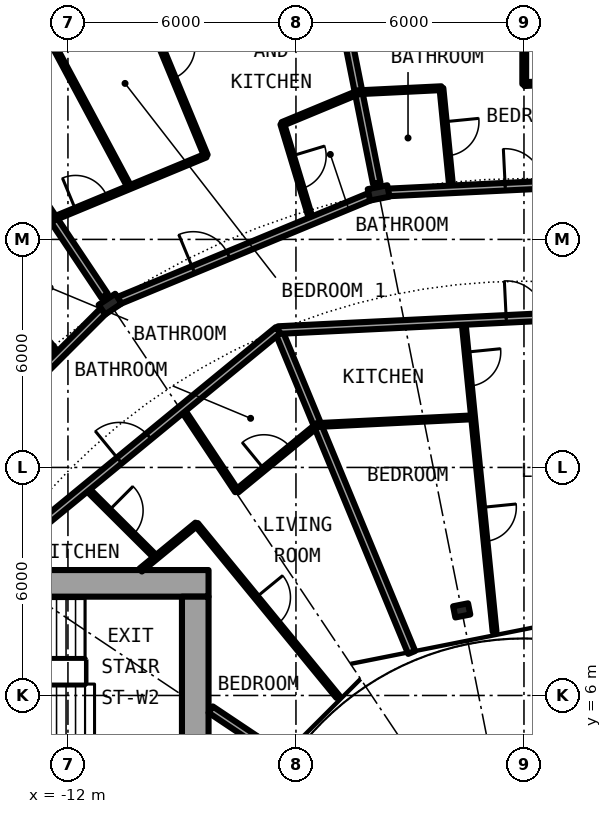
"""IFC4 building model, lengths in metres.
Left out: names, types, materials, properties, quantities, classifications, styles, units other than length and angle.
Written with IfcOpenShell. Run it as: python <this file> out.ifc"""

import sys

from ifc_helpers import new_model, si_unit, direction, frame, frame_2d, origin, origin_2d, place, context, subcontext, project, spatial, rectangle, i_section, extrude, element, fill, save


model = new_model("IFC4")
c1 = context("Model", 3, precision=1e-05, world=origin(), true_north=direction((0.0, 1.0)))
c2 = subcontext(c1, "Body", "Model", "MODEL_VIEW")
j1 = project(units=[si_unit("LENGTHUNIT", "METRE"), si_unit("PLANEANGLEUNIT", "RADIAN")], contexts=[c1])
p1 = place(None, origin())
s1 = spatial("IfcSite", under=j1, at=p1, CompositionType="ELEMENT")
p2 = place(p1, origin())
s2 = spatial("IfcBuilding", under=s1, at=p2, CompositionType="ELEMENT")
p3 = place(p2, frame((0.0, 0.0, 72.75)))
s3 = spatial("IfcBuildingStorey", under=s2, at=p3, CompositionType="ELEMENT", Elevation=72.75)
for number, where, z_axis, x_axis in (
    (1, (-3.824, 19.223, 0.0), (0.0, 0.0, 1.0), (-0.195, 0.981, 0.0)),
    (2, (-10.889, 16.297, 0.0), (0.0, 0.0, 1.0), (-0.556, 0.831, 0.0)),
):
    element("IfcColumn", number, at=place(p3, frame(where, z_axis=z_axis, x_axis=x_axis)), inside=s3, PredefinedType="COLUMN", context=c2, shape_type="SweptSolid", body=[
        extrude(i_section(OverallWidth=0.306, OverallDepth=0.524, WebThickness=0.021, FlangeThickness=0.04, FilletRadius=0.027, at=origin_2d()), origin(), (0.0, 0.0, 1.0), 3.05),
    ])
p4 = place(p3, frame((-1.639, 8.239, 0.0), z_axis=(0.0, 0.0, 1.0), x_axis=(-0.195090322016, 0.980785280403, 0.0)))
e3 = element("IfcColumn", 3, at=p4, inside=s3, PredefinedType="COLUMN", context=c2, shape_type="SweptSolid", body=[
    extrude(i_section(OverallWidth=0.3, OverallDepth=0.4, WebThickness=0.013, FlangeThickness=0.024, FilletRadius=0.027, at=origin_2d()), origin(), (0.0, 0.0, 1.0), 3.05),
])
p5 = place(p3, frame((-10.447, 25.222, 0.0), z_axis=(0.0, 0.0, 1.0), x_axis=(-0.881915646801, -0.471407246368, 0.0)))
e4 = element("IfcWall", 4, at=p5, inside=s3, PredefinedType="SOLIDWALL", context=c2, shape_type="SweptSolid", body=[
    extrude(rectangle(XDim=5.352, YDim=0.25, at=frame_2d((2.676, 0.0))), origin(), (0.0, 0.0, 1.0), 2.7),
])
p6 = place(p5, frame((0.441, 0.0, 0.3)))
e5 = element("IfcOpeningElement", 5, at=p6, cuts=e4, PredefinedType="OPENING", context=c2, shape_type="SweptSolid", body=[
    extrude(rectangle(XDim=1.8, YDim=2.1, at=frame_2d((0.9, 1.05))), frame((0.0, 0.135, 0.0), z_axis=(0.0, -1.0, 0.0), x_axis=(1.0, 0.0, 0.0)), (0.0, 0.0, 1.0), 0.27),
])
p7 = place(p5, frame((3.51, 0.0, 0.0)))
e6 = element("IfcOpeningElement", 6, at=p7, cuts=e4, PredefinedType="OPENING", context=c2, shape_type="SweptSolid", body=[
    extrude(rectangle(XDim=1.0, YDim=2.2, at=frame_2d((0.5, 1.1))), frame((0.0, 0.135, 0.0), z_axis=(0.0, -1.0, 0.0), x_axis=(1.0, 0.0, 0.0)), (0.0, 0.0, 1.0), 0.27),
])
p8 = place(p3, frame((-8.3, 8.95, 0.0), z_axis=(0.0, 0.0, 1.0), x_axis=(-1.0, 0.0, 0.0)))
e7 = element("IfcWall", 7, at=p8, inside=s3, PredefinedType="SHEAR", context=c2, shape_type="SweptSolid", body=[
    extrude(rectangle(XDim=14.0, YDim=0.7, at=frame_2d((7.0, 0.0))), origin(), (0.0, 0.0, 1.0), 3.05),
])
p9 = place(p8, frame((11.575, 0.0, 0.0)))
e8 = element("IfcOpeningElement", 8, at=p9, cuts=e7, PredefinedType="OPENING", context=c2, shape_type="SweptSolid", body=[
    extrude(rectangle(XDim=1.2, YDim=2.3, at=frame_2d((0.6, 1.15))), frame((0.0, 0.36, 0.0), z_axis=(0.0, -1.0, 0.0), x_axis=(1.0, 0.0, 0.0)), (0.0, 0.0, 1.0), 0.72),
])
p10 = place(p3, frame((-8.65, 8.6, 0.0), z_axis=(0.0, 0.0, 1.0), x_axis=(0.0, -1.0, 0.0)))
e9 = element("IfcWall", 9, at=p10, inside=s3, PredefinedType="SHEAR", context=c2, shape_type="SweptSolid", body=[
    extrude(rectangle(XDim=17.2, YDim=0.7, at=frame_2d((8.6, 0.0))), origin(), (0.0, 0.0, 1.0), 3.05),
])
p11 = place(p10, frame((7.4, 0.0, 0.1)))
e10 = element("IfcOpeningElement", 10, at=p11, cuts=e9, PredefinedType="OPENING", context=c2, shape_type="SweptSolid", body=[
    extrude(rectangle(XDim=2.4, YDim=2.2, at=frame_2d((1.2, 1.1))), frame((0.0, 0.36, 0.0), z_axis=(0.0, -1.0, 0.0), x_axis=(1.0, 0.0, 0.0)), (0.0, 0.0, 1.0), 0.72),
])
p12 = place(p3, frame((-15.097, 22.595, 0.0), z_axis=(0.0, 0.0, 1.0), x_axis=(0.555516661303, -0.831505405283, 0.0)))
e11 = element("IfcWall", 11, at=p12, inside=s3, PredefinedType="PARTITIONING", context=c2, shape_type="SweptSolid", body=[
    extrude(rectangle(XDim=7.312, YDim=0.2, at=frame_2d((3.656, 0.0))), origin(), (0.0, 0.0, 1.0), 2.7),
])
p13 = place(p3, frame((-13.927, 17.004, 0.0), z_axis=(0.0, 0.0, 1.0), x_axis=(0.633582447834, -0.77367517848, 0.0)))
e12 = element("IfcWall", 12, at=p13, inside=s3, PredefinedType="PARTITIONING", context=c2, shape_type="SweptSolid", body=[
    extrude(rectangle(XDim=2.661, YDim=0.1, at=frame_2d((1.331, 0.0))), origin(), (0.0, 0.0, 1.0), 2.7),
])
p14 = place(p13, frame((0.881, 0.0, 0.0)))
e13 = element("IfcOpeningElement", 13, at=p14, cuts=e12, PredefinedType="OPENING", context=c2, shape_type="SweptSolid", body=[
    extrude(rectangle(XDim=0.9, YDim=2.3, at=frame_2d((0.45, 1.15))), frame((0.0, 0.06, 0.0), z_axis=(0.0, -1.0, 0.0), x_axis=(1.0, 0.0, 0.0)), (0.0, 0.0, 1.0), 0.12),
])
p15 = place(p3, frame((-12.833, 23.954, 0.0), z_axis=(0.0, 0.0, 1.0), x_axis=(0.472148388886, -0.881519085938, 0.0)))
e14 = element("IfcWall", 14, at=p15, inside=s3, PredefinedType="PARTITIONING", context=c2, shape_type="SweptSolid", body=[
    extrude(rectangle(XDim=5.196, YDim=0.1, at=frame_2d((2.598, 0.0))), origin(), (0.0, 0.0, 1.0), 2.7),
])
p16 = place(p3, frame((-11.524, 11.464, 0.0), z_axis=(0.0, 0.0, 1.0), x_axis=(0.708796844581, -0.705412668665, 0.0)))
e15 = element("IfcWall", 15, at=p16, inside=s3, PredefinedType="PARTITIONING", context=c2, shape_type="SweptSolid", body=[
    extrude(rectangle(XDim=2.597, YDim=0.1, at=frame_2d((1.299, 0.0))), origin(), (0.0, 0.0, 1.0), 2.7),
])
p17 = place(p16, frame((0.849, 0.0, 0.0)))
e16 = element("IfcOpeningElement", 16, at=p17, cuts=e15, PredefinedType="OPENING", context=c2, shape_type="SweptSolid", body=[
    extrude(rectangle(XDim=0.9, YDim=2.3, at=frame_2d((0.45, 1.15))), frame((0.0, 0.06, 0.0), z_axis=(0.0, -1.0, 0.0), x_axis=(1.0, 0.0, 0.0)), (0.0, 0.0, 1.0), 0.12),
])
p18 = place(p3, frame((-10.399, 25.106, 0.0), z_axis=(0.0, 0.0, 1.0), x_axis=(0.382620183578, -0.92390572848, 0.0)))
e17 = element("IfcWall", 17, at=p18, inside=s3, PredefinedType="PARTITIONING", context=c2, shape_type="SweptSolid", body=[
    extrude(rectangle(XDim=5.302, YDim=0.1, at=frame_2d((2.651, 0.0))), origin(), (0.0, 0.0, 1.0), 2.7),
])
p19 = place(p18, frame((2.201, 0.0, 0.0)))
e18 = element("IfcOpeningElement", 18, at=p19, cuts=e17, PredefinedType="OPENING", context=c2, shape_type="SweptSolid", body=[
    extrude(rectangle(XDim=0.9, YDim=2.3, at=frame_2d((0.45, 1.15))), frame((0.0, 0.06, 0.0), z_axis=(0.0, -1.0, 0.0), x_axis=(1.0, 0.0, 0.0)), (0.0, 0.0, 1.0), 0.12),
])
p20 = place(p3, frame((-8.996, 13.539, 0.0), z_axis=(0.0, 0.0, 1.0), x_axis=(0.553615197403, -0.83277260594, 0.0)))
e19 = element("IfcWall", 19, at=p20, inside=s3, PredefinedType="PARTITIONING", context=c2, shape_type="SweptSolid", body=[
    extrude(rectangle(XDim=2.597, YDim=0.1, at=frame_2d((1.299, 0.0))), origin(), (0.0, 0.0, 1.0), 2.7),
])
p21 = place(p3, frame((-8.62, 10.504, 0.0), z_axis=(0.0, 0.0, 1.0), x_axis=(0.634358693064, -0.773038840249, 0.0)))
e20 = element("IfcWall", 20, at=p21, inside=s3, PredefinedType="PARTITIONING", context=c2, shape_type="SweptSolid", body=[
    extrude(rectangle(XDim=5.868, YDim=0.1, at=frame_2d((2.934, 0.0))), origin(), (0.0, 0.0, 1.0), 2.7),
])
p22 = place(p21, frame((2.484, 0.0, 0.0)))
e21 = element("IfcOpeningElement", 21, at=p22, cuts=e20, PredefinedType="OPENING", context=c2, shape_type="SweptSolid", body=[
    extrude(rectangle(XDim=0.9, YDim=2.3, at=frame_2d((0.45, 1.15))), frame((0.0, 0.06, 0.0), z_axis=(0.0, -1.0, 0.0), x_axis=(1.0, 0.0, 0.0)), (0.0, 0.0, 1.0), 0.12),
])
p23 = place(p3, frame((-6.468, 15.614, 0.0), z_axis=(0.0, 0.0, 1.0), x_axis=(0.382646942224, -0.923894646378, 0.0)))
e22 = element("IfcWall", 22, at=p23, inside=s3, PredefinedType="PARTITIONING", context=c2, shape_type="SweptSolid", body=[
    extrude(rectangle(XDim=9.181, YDim=0.2, at=frame_2d((4.59, 0.0))), origin(), (0.0, 0.0, 1.0), 2.7),
])
p24 = place(p3, frame((-6.36, 21.039, 0.0), z_axis=(0.0, 0.0, 1.0), x_axis=(0.289375816213, -0.957215564537, 0.0)))
e23 = element("IfcWall", 23, at=p24, inside=s3, PredefinedType="PARTITIONING", context=c2, shape_type="SweptSolid", body=[
    extrude(rectangle(XDim=2.661, YDim=0.1, at=frame_2d((1.331, 0.0))), origin(), (0.0, 0.0, 1.0), 2.7),
])
p25 = place(p24, frame((0.88, 0.0, 0.0)))
e24 = element("IfcOpeningElement", 24, at=p25, cuts=e23, PredefinedType="OPENING", context=c2, shape_type="SweptSolid", body=[
    extrude(rectangle(XDim=0.9, YDim=2.3, at=frame_2d((0.45, 1.15))), frame((0.0, 0.06, 0.0), z_axis=(0.0, -1.0, 0.0), x_axis=(1.0, 0.0, 0.0)), (0.0, 0.0, 1.0), 0.12),
])
p26 = place(p3, frame((-5.302, 26.653, 0.0), z_axis=(0.0, 0.0, 1.0), x_axis=(0.195114589291, -0.98078045303, 0.0)))
e25 = element("IfcWall", 25, at=p26, inside=s3, PredefinedType="PARTITIONING", context=c2, shape_type="SweptSolid", body=[
    extrude(rectangle(XDim=7.314, YDim=0.2, at=frame_2d((3.657, 0.0))), origin(), (0.0, 0.0, 1.0), 2.7),
])
p27 = place(p3, frame((-2.172, 21.979, 0.0), z_axis=(0.0, 0.0, 1.0), x_axis=(0.098383180323, -0.995148606907, 0.0)))
e26 = element("IfcWall", 26, at=p27, inside=s3, PredefinedType="PARTITIONING", context=c2, shape_type="SweptSolid", body=[
    extrude(rectangle(XDim=2.675, YDim=0.1, at=frame_2d((1.337, 0.0))), origin(), (0.0, 0.0, 1.0), 2.7),
])
p28 = place(p27, frame((0.887, 0.0, 0.0)))
e27 = element("IfcOpeningElement", 27, at=p28, cuts=e26, PredefinedType="OPENING", context=c2, shape_type="SweptSolid", body=[
    extrude(rectangle(XDim=0.9, YDim=2.3, at=frame_2d((0.45, 1.15))), frame((0.0, 0.06, 0.0), z_axis=(0.0, -1.0, 0.0), x_axis=(1.0, 0.0, 0.0)), (0.0, 0.0, 1.0), 0.12),
])
p29 = place(p3, frame((-1.593, 15.853, 0.0), z_axis=(0.0, 0.0, 1.0), x_axis=(0.099730339513, -0.995014502096, 0.0)))
e28 = element("IfcWall", 28, at=p29, inside=s3, PredefinedType="PARTITIONING", context=c2, shape_type="SweptSolid", body=[
    extrude(rectangle(XDim=8.213, YDim=0.1, at=frame_2d((4.106, 0.0))), origin(), (0.0, 0.0, 1.0), 2.7),
])
p30 = place(p29, frame((0.823, 0.0, 0.0)))
e29 = element("IfcOpeningElement", 29, at=p30, cuts=e28, PredefinedType="OPENING", context=c2, shape_type="SweptSolid", body=[
    extrude(rectangle(XDim=0.9, YDim=2.3, at=frame_2d((0.45, 1.15))), frame((0.0, 0.06, 0.0), z_axis=(0.0, -1.0, 0.0), x_axis=(1.0, 0.0, 0.0)), (0.0, 0.0, 1.0), 0.12),
])
p31 = place(p29, frame((4.929, 0.0, 0.0)))
e30 = element("IfcOpeningElement", 30, at=p31, cuts=e28, PredefinedType="OPENING", context=c2, shape_type="SweptSolid", body=[
    extrude(rectangle(XDim=0.9, YDim=2.3, at=frame_2d((0.45, 1.15))), frame((0.0, 0.06, 0.0), z_axis=(0.0, -1.0, 0.0), x_axis=(1.0, 0.0, 0.0)), (0.0, 0.0, 1.0), 0.12),
])
p32 = place(p3, frame((0.007, 22.086, 0.0), z_axis=(0.0, 0.0, 1.0), x_axis=(0.000383785052, 0.999999926355, 0.0)))
e31 = element("IfcWall", 31, at=p32, inside=s3, PredefinedType="PARTITIONING", context=c2, shape_type="SweptSolid", body=[
    extrude(rectangle(XDim=5.089, YDim=0.1, at=frame_2d((2.544, 0.0))), origin(), (0.0, 0.0, 1.0), 2.7),
])
p33 = place(p32, frame((2.095, 0.0, 0.0)))
e32 = element("IfcOpeningElement", 32, at=p33, cuts=e31, PredefinedType="OPENING", context=c2, shape_type="SweptSolid", body=[
    extrude(rectangle(XDim=0.9, YDim=2.3, at=frame_2d((0.45, 1.15))), frame((0.0, 0.06, 0.0), z_axis=(0.0, -1.0, 0.0), x_axis=(1.0, 0.0, 0.0)), (0.0, 0.0, 1.0), 0.12),
])
p34 = place(p3, frame((-6.513, 4.472, 0.0), z_axis=(0.0, 0.0, 1.0), x_axis=(-0.831382204863, 0.555701025225, 0.0)))
e33 = element("IfcWall", 33, at=p34, inside=s3, PredefinedType="PARTITIONING", context=c2, shape_type="SweptSolid", body=[
    extrude(rectangle(XDim=2.082, YDim=0.2, at=frame_2d((1.041, 0.0))), origin(), (0.0, 0.0, 1.0), 2.7),
])
p35 = place(p3, frame((-5.439, 13.116, 0.0), z_axis=(0.0, 0.0, 1.0), x_axis=(0.998772010578, 0.049542616872, 0.0)))
e34 = element("IfcWall", 34, at=p35, inside=s3, PredefinedType="PARTITIONING", context=c2, shape_type="SweptSolid", body=[
    extrude(rectangle(XDim=4.1, YDim=0.1, at=frame_2d((2.05, 0.0))), origin(), (0.0, 0.0, 1.0), 2.7),
])
p36 = place(p3, frame((-10.087, 9.3, 0.0), z_axis=(0.0, 0.0, 1.0), x_axis=(0.772957368531, 0.6344579627, 0.0)))
e35 = element("IfcWall", 35, at=p36, inside=s3, PredefinedType="PARTITIONING", context=c2, shape_type="SweptSolid", body=[
    extrude(rectangle(XDim=1.906, YDim=0.1, at=frame_2d((0.953, 0.0))), origin(), (0.0, 0.0, 1.0), 2.7),
])
p37 = place(p3, frame((-7.552, 11.379, 0.0), z_axis=(0.0, 0.0, 1.0), x_axis=(0.773323547924, 0.634011585246, 0.0)))
e36 = element("IfcWall", 36, at=p37, inside=s3, PredefinedType="PARTITIONING", context=c2, shape_type="SweptSolid", body=[
    extrude(rectangle(XDim=2.748, YDim=0.1, at=frame_2d((1.374, 0.0))), origin(), (0.0, 0.0, 1.0), 2.7),
])
p38 = place(p37, frame((0.917, 0.0, 0.0)))
e37 = element("IfcOpeningElement", 37, at=p38, cuts=e36, PredefinedType="OPENING", context=c2, shape_type="SweptSolid", body=[
    extrude(rectangle(XDim=0.9, YDim=2.3, at=frame_2d((0.45, 1.15))), frame((0.0, 0.06, 0.0), z_axis=(0.0, -1.0, 0.0), x_axis=(1.0, 0.0, 0.0)), (0.0, 0.0, 1.0), 0.12),
])
p39 = place(p3, frame((-6.468, 15.614, 0.0), z_axis=(0.0, 0.0, 1.0), x_axis=(0.998797695979, 0.049022061427, 0.0)))
e38 = element("IfcWall", 38, at=p39, inside=s3, PredefinedType="PARTITIONING", context=c2, shape_type="SweptSolid", body=[
    extrude(rectangle(XDim=11.385, YDim=0.2, at=frame_2d((5.692, 0.0))), origin(), (0.0, 0.0, 1.0), 2.7),
])
p40 = place(p39, frame((6.008, 0.0, 0.0)))
e39 = element("IfcOpeningElement", 39, at=p40, cuts=e38, PredefinedType="OPENING", context=c2, shape_type="SweptSolid", body=[
    extrude(rectangle(XDim=1.0, YDim=2.3, at=frame_2d((0.5, 1.15))), frame((0.0, 0.11, 0.0), z_axis=(0.0, -1.0, 0.0), x_axis=(1.0, 0.0, 0.0)), (0.0, 0.0, 1.0), 0.22),
])
p41 = place(p3, frame((-14.052, 9.389, 0.0), z_axis=(0.0, 0.0, 1.0), x_axis=(0.77292501819, 0.634497372931, 0.0)))
e40 = element("IfcWall", 40, at=p41, inside=s3, PredefinedType="PARTITIONING", context=c2, shape_type="SweptSolid", body=[
    extrude(rectangle(XDim=9.81, YDim=0.2, at=frame_2d((4.905, 0.0))), origin(), (0.0, 0.0, 1.0), 2.7),
])
p42 = place(p41, frame((4.406, 0.0, 0.0)))
e41 = element("IfcOpeningElement", 41, at=p42, cuts=e40, PredefinedType="OPENING", context=c2, shape_type="SweptSolid", body=[
    extrude(rectangle(XDim=1.0, YDim=2.3, at=frame_2d((0.5, 1.15))), frame((0.0, 0.11, 0.0), z_axis=(0.0, -1.0, 0.0), x_axis=(1.0, 0.0, 0.0)), (0.0, 0.0, 1.0), 0.22),
])
p43 = place(p3, frame((-16.186, 11.0, 0.0), z_axis=(0.0, 0.0, 1.0), x_axis=(0.707106781187, 0.707106781187, 0.0)))
e42 = element("IfcWall", 42, at=p43, inside=s3, PredefinedType="PARTITIONING", context=c2, shape_type="SweptSolid", body=[
    extrude(rectangle(XDim=7.334, YDim=0.2, at=frame_2d((3.667, 0.0))), origin(), (0.0, 0.0, 1.0), 2.38),
])
p44 = place(p43, frame((2.211, 0.0, 0.0)))
e43 = element("IfcOpeningElement", 43, at=p44, cuts=e42, PredefinedType="OPENING", context=c2, shape_type="SweptSolid", body=[
    extrude(rectangle(XDim=1.0, YDim=2.3, at=frame_2d((0.5, 1.15))), frame((0.0, 0.11, 0.0), z_axis=(0.0, -1.0, 0.0), x_axis=(1.0, 0.0, 0.0)), (0.0, 0.0, 1.0), 0.22),
])
p45 = place(p3, frame((-10.745, 16.357, 0.0), z_axis=(0.0, 0.0, 1.0), x_axis=(0.923928411035, 0.382565407848, 0.0)))
e44 = element("IfcWall", 44, at=p45, inside=s3, PredefinedType="PARTITIONING", context=c2, shape_type="SweptSolid", body=[
    extrude(rectangle(XDim=7.335, YDim=0.2, at=frame_2d((3.667, 0.0))), origin(), (0.0, 0.0, 1.0), 2.38),
])
p46 = place(p45, frame((2.212, 0.0, 0.0)))
e45 = element("IfcOpeningElement", 45, at=p46, cuts=e44, PredefinedType="OPENING", context=c2, shape_type="SweptSolid", body=[
    extrude(rectangle(XDim=1.0, YDim=2.3, at=frame_2d((0.5, 1.15))), frame((0.0, 0.11, 0.0), z_axis=(0.0, -1.0, 0.0), x_axis=(1.0, 0.0, 0.0)), (0.0, 0.0, 1.0), 0.22),
])
p47 = place(p3, frame((-3.669, 19.231, 0.0), z_axis=(0.0, 0.0, 1.0), x_axis=(0.998803644396, 0.048900715146, 0.0)))
e46 = element("IfcWall", 46, at=p47, inside=s3, PredefinedType="PARTITIONING", context=c2, shape_type="SweptSolid", body=[
    extrude(rectangle(XDim=5.602, YDim=0.2, at=frame_2d((2.801, 0.0))), origin(), (0.0, 0.0, 1.0), 2.38),
])
p48 = place(p47, frame((3.179, 0.0, 0.0)))
e47 = element("IfcOpeningElement", 47, at=p48, cuts=e46, PredefinedType="OPENING", context=c2, shape_type="SweptSolid", body=[
    extrude(rectangle(XDim=1.0, YDim=2.3, at=frame_2d((0.5, 1.15))), frame((0.0, 0.11, 0.0), z_axis=(0.0, -1.0, 0.0), x_axis=(1.0, 0.0, 0.0)), (0.0, 0.0, 1.0), 0.22),
])
p49 = place(p3, frame((-13.924, 17.006, 0.0), z_axis=(0.0, 0.0, 1.0), x_axis=(0.707387256653, 0.706826194425, 0.0)))
e48 = element("IfcWall", 48, at=p49, inside=s3, PredefinedType="PARTITIONING", context=c2, shape_type="SweptSolid", body=[
    extrude(rectangle(XDim=2.176, YDim=0.1, at=frame_2d((1.088, 0.0))), origin(), (0.0, 0.0, 1.0), 2.7),
])
p50 = place(p3, frame((-12.397, 18.536, 0.0), z_axis=(0.0, 0.0, 1.0), x_axis=(0.923761942059, 0.382967197554, 0.0)))
e49 = element("IfcWall", 49, at=p50, inside=s3, PredefinedType="PARTITIONING", context=c2, shape_type="SweptSolid", body=[
    extrude(rectangle(XDim=4.356, YDim=0.1, at=frame_2d((2.178, 0.0))), origin(), (0.0, 0.0, 1.0), 2.7),
])
p51 = place(p50, frame((0.646, 0.0, 0.0)))
e50 = element("IfcOpeningElement", 50, at=p51, cuts=e49, PredefinedType="OPENING", context=c2, shape_type="SweptSolid", body=[
    extrude(rectangle(XDim=0.9, YDim=2.3, at=frame_2d((0.45, 1.15))), frame((0.0, 0.06, 0.0), z_axis=(0.0, -1.0, 0.0), x_axis=(1.0, 0.0, 0.0)), (0.0, 0.0, 1.0), 0.12),
])
p52 = place(p3, frame((-6.36, 21.039, 0.0), z_axis=(0.0, 0.0, 1.0), x_axis=(0.923743082263, 0.383012686436, 0.0)))
e51 = element("IfcWall", 51, at=p52, inside=s3, PredefinedType="PARTITIONING", context=c2, shape_type="SweptSolid", body=[
    extrude(rectangle(XDim=2.175, YDim=0.1, at=frame_2d((1.087, 0.0))), origin(), (0.0, 0.0, 1.0), 2.7),
])
for number, where, z_axis, x_axis in (
    (52, (-4.351, 21.872, 0.0), (0.0, 0.0, 1.0), (0.999, 0.049, 0.0)),
    (53, (0.007, 22.086, 0.0), (0.0, 0.0, 1.0), (0.999, 0.049, 0.0)),
):
    element("IfcWall", number, at=place(p3, frame(where, z_axis=z_axis, x_axis=x_axis)), inside=s3, PredefinedType="PARTITIONING", context=c2, shape_type="SweptSolid", body=[
        extrude(rectangle(XDim=2.182, YDim=0.1, at=frame_2d((1.091, 0.0))), origin(), (0.0, 0.0, 1.0), 2.7),
    ])
p53 = place(p48, origin())
e54 = element("IfcDoor", 54, at=p53, inside=s3, OperationType="SINGLE_SWING_RIGHT", PredefinedType="DOOR", context=c2, shape_type="SweptSolid", body=[
    extrude(rectangle(XDim=1.0, YDim=2.3, at=frame_2d((0.5, 1.15))), frame((0.0, 0.025, 0.0), z_axis=(0.0, -1.0, 0.0), x_axis=(1.0, 0.0, 0.0)), (0.0, 0.0, 1.0), 0.05),
])
fill(e47, e54)
p54 = place(p28, origin())
e55 = element("IfcDoor", 55, at=p54, inside=s3, OperationType="SINGLE_SWING_RIGHT", PredefinedType="DOOR", context=c2, shape_type="SweptSolid", body=[
    extrude(rectangle(XDim=0.9, YDim=2.3, at=frame_2d((0.45, 1.15))), frame((0.0, 0.025, 0.0), z_axis=(0.0, -1.0, 0.0), x_axis=(1.0, 0.0, 0.0)), (0.0, 0.0, 1.0), 0.05),
])
fill(e27, e55)
p55 = place(p46, origin())
e56 = element("IfcDoor", 56, at=p55, inside=s3, OperationType="SINGLE_SWING_LEFT", PredefinedType="DOOR", context=c2, shape_type="SweptSolid", body=[
    extrude(rectangle(XDim=1.0, YDim=2.3, at=frame_2d((0.5, 1.15))), frame((0.0, 0.025, 0.0), z_axis=(0.0, -1.0, 0.0), x_axis=(1.0, 0.0, 0.0)), (0.0, 0.0, 1.0), 0.05),
])
fill(e45, e56)
p56 = place(p25, origin())
e57 = element("IfcDoor", 57, at=p56, inside=s3, OperationType="SINGLE_SWING_LEFT", PredefinedType="DOOR", context=c2, shape_type="SweptSolid", body=[
    extrude(rectangle(XDim=0.9, YDim=2.3, at=frame_2d((0.45, 1.15))), frame((0.0, 0.025, 0.0), z_axis=(0.0, -1.0, 0.0), x_axis=(1.0, 0.0, 0.0)), (0.0, 0.0, 1.0), 0.05),
])
fill(e24, e57)
p57 = place(p19, origin())
e58 = element("IfcDoor", 58, at=p57, inside=s3, OperationType="SINGLE_SWING_LEFT", PredefinedType="DOOR", context=c2, shape_type="SweptSolid", body=[
    extrude(rectangle(XDim=0.9, YDim=2.3, at=frame_2d((0.45, 1.15))), frame((0.0, 0.025, 0.0), z_axis=(0.0, -1.0, 0.0), x_axis=(1.0, 0.0, 0.0)), (0.0, 0.0, 1.0), 0.05),
])
fill(e18, e58)
p58 = place(p51, origin())
e59 = element("IfcDoor", 59, at=p58, inside=s3, OperationType="SINGLE_SWING_LEFT", PredefinedType="DOOR", context=c2, shape_type="SweptSolid", body=[
    extrude(rectangle(XDim=0.9, YDim=2.3, at=frame_2d((0.45, 1.15))), frame((0.0, 0.025, 0.0), z_axis=(0.0, -1.0, 0.0), x_axis=(1.0, 0.0, 0.0)), (0.0, 0.0, 1.0), 0.05),
])
fill(e50, e59)
p59 = place(p40, origin())
e60 = element("IfcDoor", 60, at=p59, inside=s3, OperationType="SINGLE_SWING_RIGHT", PredefinedType="DOOR", context=c2, shape_type="SweptSolid", body=[
    extrude(rectangle(XDim=1.0, YDim=2.3, at=frame_2d((0.5, 1.15))), frame((0.0, 0.025, 0.0), z_axis=(0.0, -1.0, 0.0), x_axis=(1.0, 0.0, 0.0)), (0.0, 0.0, 1.0), 0.05),
])
fill(e39, e60)
p60 = place(p30, origin())
e61 = element("IfcDoor", 61, at=p60, inside=s3, OperationType="SINGLE_SWING_LEFT", PredefinedType="DOOR", context=c2, shape_type="SweptSolid", body=[
    extrude(rectangle(XDim=0.9, YDim=2.3, at=frame_2d((0.45, 1.15))), frame((0.0, 0.025, 0.0), z_axis=(0.0, -1.0, 0.0), x_axis=(1.0, 0.0, 0.0)), (0.0, 0.0, 1.0), 0.05),
])
fill(e29, e61)
p61 = place(p31, origin())
e62 = element("IfcDoor", 62, at=p61, inside=s3, OperationType="SINGLE_SWING_RIGHT", PredefinedType="DOOR", context=c2, shape_type="SweptSolid", body=[
    extrude(rectangle(XDim=0.9, YDim=2.3, at=frame_2d((0.45, 1.15))), frame((0.0, 0.025, 0.0), z_axis=(0.0, -1.0, 0.0), x_axis=(1.0, 0.0, 0.0)), (0.0, 0.0, 1.0), 0.05),
])
fill(e30, e62)
p62 = place(p42, origin())
e63 = element("IfcDoor", 63, at=p62, inside=s3, OperationType="SINGLE_SWING_RIGHT", PredefinedType="DOOR", context=c2, shape_type="SweptSolid", body=[
    extrude(rectangle(XDim=1.0, YDim=2.3, at=frame_2d((0.5, 1.15))), frame((0.0, 0.025, 0.0), z_axis=(0.0, -1.0, 0.0), x_axis=(1.0, 0.0, 0.0)), (0.0, 0.0, 1.0), 0.05),
])
fill(e41, e63)
p63 = place(p38, origin())
e64 = element("IfcDoor", 64, at=p63, inside=s3, OperationType="SINGLE_SWING_LEFT", PredefinedType="DOOR", context=c2, shape_type="SweptSolid", body=[
    extrude(rectangle(XDim=0.9, YDim=2.3, at=frame_2d((0.45, 1.15))), frame((0.0, 0.025, 0.0), z_axis=(0.0, -1.0, 0.0), x_axis=(1.0, 0.0, 0.0)), (0.0, 0.0, 1.0), 0.05),
])
fill(e37, e64)
p64 = place(p17, origin())
e65 = element("IfcDoor", 65, at=p64, inside=s3, OperationType="SINGLE_SWING_RIGHT", PredefinedType="DOOR", context=c2, shape_type="SweptSolid", body=[
    extrude(rectangle(XDim=0.9, YDim=2.3, at=frame_2d((0.45, 1.15))), frame((0.0, 0.025, 0.0), z_axis=(0.0, -1.0, 0.0), x_axis=(1.0, 0.0, 0.0)), (0.0, 0.0, 1.0), 0.05),
])
fill(e16, e65)
p65 = place(p22, origin())
e66 = element("IfcDoor", 66, at=p65, inside=s3, OperationType="SINGLE_SWING_RIGHT", PredefinedType="DOOR", context=c2, shape_type="SweptSolid", body=[
    extrude(rectangle(XDim=0.9, YDim=2.3, at=frame_2d((0.45, 1.15))), frame((0.0, 0.025, 0.0), z_axis=(0.0, -1.0, 0.0), x_axis=(1.0, 0.0, 0.0)), (0.0, 0.0, 1.0), 0.05),
])
fill(e21, e66)
save(model, sys.argv[1])
